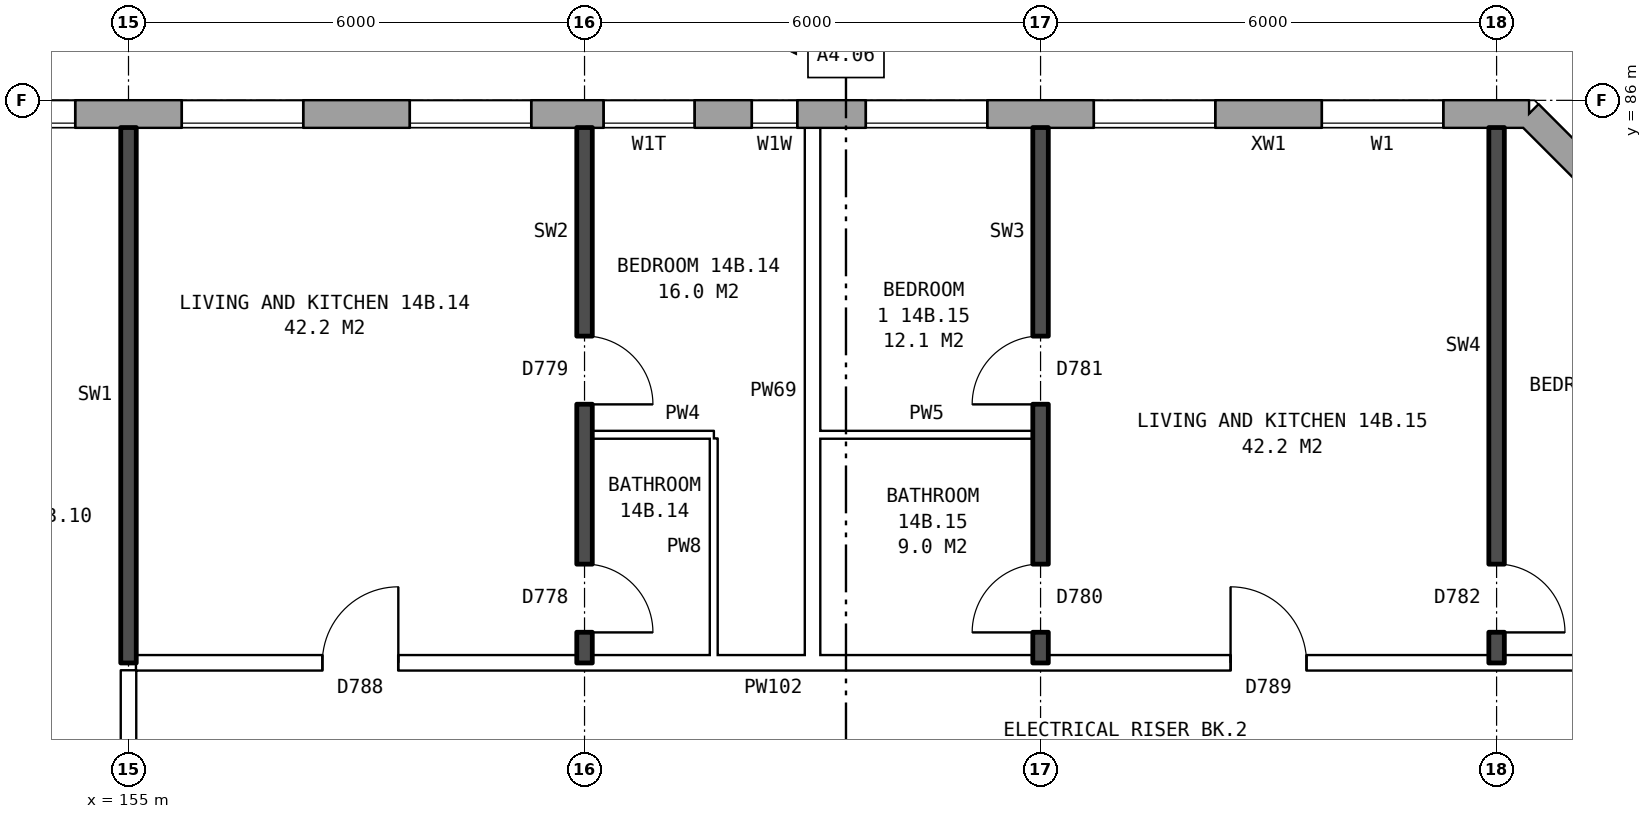
"""IFC4 building model, lengths in metres.
Left out: names, types, materials, properties, quantities, classifications, styles, units other than length and angle.
Written with IfcOpenShell. Run it as: python <this file> out.ifc"""

import sys

from ifc_helpers import new_model, si_unit, direction, frame, frame_2d, origin, place, context, subcontext, project, spatial, rectangle, extrude, element, fill, save


model = new_model("IFC4")
c1 = context("Model", 3, precision=1e-05, world=origin(), true_north=direction((0.0, 1.0)))
c2 = subcontext(c1, "Body", "Model", "MODEL_VIEW")
j1 = project(units=[si_unit("LENGTHUNIT", "METRE"), si_unit("PLANEANGLEUNIT", "RADIAN")], contexts=[c1])
p1 = place(None, origin())
s1 = spatial("IfcSite", under=j1, at=p1, CompositionType="ELEMENT")
p2 = place(p1, origin())
s2 = spatial("IfcBuilding", under=s1, at=p2, CompositionType="ELEMENT")
p3 = place(p2, frame((0.0, 0.0, 53.6)))
s3 = spatial("IfcBuildingStorey", under=s2, at=p3, CompositionType="ELEMENT", Elevation=53.6)
p4 = place(p3, frame((176.32, 82.925, 0.0), z_axis=(0.0, 0.0, 1.0), x_axis=(-0.707106781187, 0.707106781187, 0.0)))
e1 = element("IfcWall", 1, at=p4, inside=s3, PredefinedType="STANDARD", context=c2, shape_type="SweptSolid", body=[
    extrude(rectangle(XDim=4.094, YDim=0.36, at=frame_2d((2.047, 0.0))), origin(), (0.0, 0.0, 1.0), 2.85),
])
p5 = place(p4, frame((1.247, 0.0, 0.8)))
e2 = element("IfcOpeningElement", 2, at=p5, cuts=e1, PredefinedType="OPENING", context=c2, shape_type="SweptSolid", body=[
    extrude(rectangle(XDim=1.6, YDim=1.8, at=frame_2d((0.8, 0.9))), frame((0.0, 0.19, 0.0), z_axis=(0.0, -1.0, 0.0), x_axis=(1.0, 0.0, 0.0)), (0.0, 0.0, 1.0), 0.38),
])
p6 = place(p3, frame((173.425, 85.82, 0.0), z_axis=(0.0, 0.0, 1.0), x_axis=(-1.0, 0.0, 0.0)))
e3 = element("IfcWall", 3, at=p6, inside=s3, PredefinedType="STANDARD", context=c2, shape_type="SweptSolid", body=[
    extrude(rectangle(XDim=39.351, YDim=0.36, at=frame_2d((19.675, 0.0))), origin(), (0.0, 0.0, 1.0), 2.85),
])
p7 = place(p6, frame((1.125, 0.0, 0.8)))
e4 = element("IfcOpeningElement", 4, at=p7, cuts=e3, PredefinedType="OPENING", context=c2, shape_type="SweptSolid", body=[
    extrude(rectangle(XDim=1.6, YDim=1.8, at=frame_2d((0.8, 0.9))), frame((0.0, 0.19, 0.0), z_axis=(0.0, -1.0, 0.0), x_axis=(1.0, 0.0, 0.0)), (0.0, 0.0, 1.0), 0.38),
])
p8 = place(p6, frame((4.125, 0.0, 0.8)))
e5 = element("IfcOpeningElement", 5, at=p8, cuts=e3, PredefinedType="OPENING", context=c2, shape_type="SweptSolid", body=[
    extrude(rectangle(XDim=1.6, YDim=1.8, at=frame_2d((0.8, 0.9))), frame((0.0, 0.19, 0.0), z_axis=(0.0, -1.0, 0.0), x_axis=(1.0, 0.0, 0.0)), (0.0, 0.0, 1.0), 0.38),
])
p9 = place(p6, frame((7.125, 0.0, 0.8)))
e6 = element("IfcOpeningElement", 6, at=p9, cuts=e3, PredefinedType="OPENING", context=c2, shape_type="SweptSolid", body=[
    extrude(rectangle(XDim=1.6, YDim=1.8, at=frame_2d((0.8, 0.9))), frame((0.0, 0.19, 0.0), z_axis=(0.0, -1.0, 0.0), x_axis=(1.0, 0.0, 0.0)), (0.0, 0.0, 1.0), 0.38),
])
p10 = place(p6, frame((9.625, 0.0, 1.65)))
e7 = element("IfcOpeningElement", 7, at=p10, cuts=e3, PredefinedType="OPENING", context=c2, shape_type="SweptSolid", body=[
    extrude(rectangle(XDim=0.6, YDim=0.9, at=frame_2d((0.3, 0.45))), frame((0.0, 0.19, 0.0), z_axis=(0.0, -1.0, 0.0), x_axis=(1.0, 0.0, 0.0)), (0.0, 0.0, 1.0), 0.38),
])
p11 = place(p6, frame((13.125, 0.0, 0.8)))
e8 = element("IfcOpeningElement", 8, at=p11, cuts=e3, PredefinedType="OPENING", context=c2, shape_type="SweptSolid", body=[
    extrude(rectangle(XDim=1.6, YDim=1.8, at=frame_2d((0.8, 0.9))), frame((0.0, 0.19, 0.0), z_axis=(0.0, -1.0, 0.0), x_axis=(1.0, 0.0, 0.0)), (0.0, 0.0, 1.0), 0.38),
])
p12 = place(p6, frame((16.125, 0.0, 0.8)))
e9 = element("IfcOpeningElement", 9, at=p12, cuts=e3, PredefinedType="OPENING", context=c2, shape_type="SweptSolid", body=[
    extrude(rectangle(XDim=1.6, YDim=1.8, at=frame_2d((0.8, 0.9))), frame((0.0, 0.19, 0.0), z_axis=(0.0, -1.0, 0.0), x_axis=(1.0, 0.0, 0.0)), (0.0, 0.0, 1.0), 0.38),
])
p13 = place(p6, frame((19.125, 0.0, 0.8)))
e10 = element("IfcOpeningElement", 10, at=p13, cuts=e3, PredefinedType="OPENING", context=c2, shape_type="SweptSolid", body=[
    extrude(rectangle(XDim=1.6, YDim=1.8, at=frame_2d((0.8, 0.9))), frame((0.0, 0.19, 0.0), z_axis=(0.0, -1.0, 0.0), x_axis=(1.0, 0.0, 0.0)), (0.0, 0.0, 1.0), 0.38),
])
p14 = place(p6, frame((22.125, 0.0, 0.8)))
e11 = element("IfcOpeningElement", 11, at=p14, cuts=e3, PredefinedType="OPENING", context=c2, shape_type="SweptSolid", body=[
    extrude(rectangle(XDim=1.6, YDim=1.8, at=frame_2d((0.8, 0.9))), frame((0.0, 0.19, 0.0), z_axis=(0.0, -1.0, 0.0), x_axis=(1.0, 0.0, 0.0)), (0.0, 0.0, 1.0), 0.38),
])
p15 = place(p6, frame((25.125, 0.0, 0.8)))
e12 = element("IfcOpeningElement", 12, at=p15, cuts=e3, PredefinedType="OPENING", context=c2, shape_type="SweptSolid", body=[
    extrude(rectangle(XDim=1.6, YDim=1.8, at=frame_2d((0.8, 0.9))), frame((0.0, 0.19, 0.0), z_axis=(0.0, -1.0, 0.0), x_axis=(1.0, 0.0, 0.0)), (0.0, 0.0, 1.0), 0.38),
])
p16 = place(p6, frame((27.575, 0.0, 0.15)))
e13 = element("IfcOpeningElement", 13, at=p16, cuts=e3, PredefinedType="OPENING", context=c2, shape_type="SweptSolid", body=[
    extrude(rectangle(XDim=1.0, YDim=0.9, at=frame_2d((0.5, 0.45))), frame((0.0, 0.19, 0.0), z_axis=(0.0, -1.0, 0.0), x_axis=(1.0, 0.0, 0.0)), (0.0, 0.0, 1.0), 0.38),
])
p17 = place(p6, frame((31.125, 0.0, 0.8)))
e14 = element("IfcOpeningElement", 14, at=p17, cuts=e3, PredefinedType="OPENING", context=c2, shape_type="SweptSolid", body=[
    extrude(rectangle(XDim=1.6, YDim=1.8, at=frame_2d((0.8, 0.9))), frame((0.0, 0.19, 0.0), z_axis=(0.0, -1.0, 0.0), x_axis=(1.0, 0.0, 0.0)), (0.0, 0.0, 1.0), 0.38),
])
p18 = place(p6, frame((34.125, 0.0, 0.8)))
e15 = element("IfcOpeningElement", 15, at=p18, cuts=e3, PredefinedType="OPENING", context=c2, shape_type="SweptSolid", body=[
    extrude(rectangle(XDim=1.6, YDim=1.8, at=frame_2d((0.8, 0.9))), frame((0.0, 0.19, 0.0), z_axis=(0.0, -1.0, 0.0), x_axis=(1.0, 0.0, 0.0)), (0.0, 0.0, 1.0), 0.38),
])
p19 = place(p6, frame((37.125, 0.0, 0.8)))
e16 = element("IfcOpeningElement", 16, at=p19, cuts=e3, PredefinedType="OPENING", context=c2, shape_type="SweptSolid", body=[
    extrude(rectangle(XDim=1.6, YDim=1.8, at=frame_2d((0.8, 0.9))), frame((0.0, 0.19, 0.0), z_axis=(0.0, -1.0, 0.0), x_axis=(1.0, 0.0, 0.0)), (0.0, 0.0, 1.0), 0.38),
])
p20 = place(p6, frame((10.975, 0.0, 0.35)))
e17 = element("IfcOpeningElement", 17, at=p20, cuts=e3, PredefinedType="OPENING", context=c2, shape_type="SweptSolid", body=[
    extrude(rectangle(XDim=1.2, YDim=0.9, at=frame_2d((0.6, 0.45))), frame((0.0, 0.19, 0.0), z_axis=(0.0, -1.0, 0.0), x_axis=(1.0, 0.0, 0.0)), (0.0, 0.0, 1.0), 0.38),
])
p21 = place(p6, frame((29.125, 0.0, 1.65)))
e18 = element("IfcOpeningElement", 18, at=p21, cuts=e3, PredefinedType="OPENING", context=c2, shape_type="SweptSolid", body=[
    extrude(rectangle(XDim=1.0, YDim=0.9, at=frame_2d((0.5, 0.45))), frame((0.0, 0.19, 0.0), z_axis=(0.0, -1.0, 0.0), x_axis=(1.0, 0.0, 0.0)), (0.0, 0.0, 1.0), 0.38),
])
p22 = place(p3, frame((155.1, 78.6, 0.0), z_axis=(0.0, 0.0, 1.0), x_axis=(1.0, 0.0, 0.0)))
e19 = element("IfcWall", 19, at=p22, inside=s3, PredefinedType="PARTITIONING", context=c2, shape_type="SweptSolid", body=[
    extrude(rectangle(XDim=21.04, YDim=0.2, at=frame_2d((10.52, 0.0))), origin(), (0.0, 0.0, 1.0), 2.85),
])
p23 = place(p22, frame((2.45, 0.0, 0.0)))
e20 = element("IfcOpeningElement", 20, at=p23, cuts=e19, PredefinedType="OPENING", context=c2, shape_type="SweptSolid", body=[
    extrude(rectangle(XDim=1.0, YDim=2.1, at=frame_2d((0.5, 1.05))), frame((0.0, 0.11, 0.0), z_axis=(0.0, -1.0, 0.0), x_axis=(1.0, 0.0, 0.0)), (0.0, 0.0, 1.0), 0.22),
])
p24 = place(p22, frame((14.4, 0.0, 0.0)))
e21 = element("IfcOpeningElement", 21, at=p24, cuts=e19, PredefinedType="OPENING", context=c2, shape_type="SweptSolid", body=[
    extrude(rectangle(XDim=1.0, YDim=2.1, at=frame_2d((0.5, 1.05))), frame((0.0, 0.11, 0.0), z_axis=(0.0, -1.0, 0.0), x_axis=(1.0, 0.0, 0.0)), (0.0, 0.0, 1.0), 0.22),
])
p25 = place(p3, frame((161.1, 81.6, 0.0), z_axis=(0.0, 0.0, 1.0), x_axis=(1.0, 0.0, 0.0)))
e22 = element("IfcWall", 22, at=p25, inside=s3, PredefinedType="PARTITIONING", context=c2, shape_type="SweptSolid", body=[
    extrude(rectangle(XDim=1.6, YDim=0.1, at=frame_2d((0.8, 0.0))), origin(), (0.0, 0.0, 1.0), 2.85),
])
p26 = place(p3, frame((164.1, 81.6, 0.0), z_axis=(0.0, 0.0, 1.0), x_axis=(1.0, 0.0, 0.0)))
e23 = element("IfcWall", 23, at=p26, inside=s3, PredefinedType="PARTITIONING", context=c2, shape_type="SweptSolid", body=[
    extrude(rectangle(XDim=2.8, YDim=0.1, at=frame_2d((1.4, 0.0))), origin(), (0.0, 0.0, 1.0), 2.85),
])
p27 = place(p3, frame((155.0, 76.3, 0.0), z_axis=(0.0, 0.0, 1.0), x_axis=(0.0, 1.0, 0.0)))
e24 = element("IfcWall", 24, at=p27, inside=s3, PredefinedType="PARTITIONING", context=c2, shape_type="SweptSolid", body=[
    extrude(rectangle(XDim=2.2, YDim=0.2, at=frame_2d((1.1, 0.0))), origin(), (0.0, 0.0, 1.0), 2.85),
])
p28 = place(p3, frame((155.0, 78.6, 0.0), z_axis=(0.0, 0.0, 1.0), x_axis=(0.0, 1.0, 0.0)))
e25 = element("IfcWall", 25, at=p28, inside=s3, PredefinedType="SOLIDWALL", context=c2, shape_type="SweptSolid", body=[
    extrude(rectangle(XDim=7.04, YDim=0.2, at=frame_2d((3.52, 0.0))), origin(), (0.0, 0.0, 1.0), 2.85),
])
p29 = place(p3, frame((161.0, 78.6, 0.0), z_axis=(0.0, 0.0, 1.0), x_axis=(0.0, 1.0, 0.0)))
e26 = element("IfcWall", 26, at=p29, inside=s3, PredefinedType="SOLIDWALL", context=c2, shape_type="SweptSolid", body=[
    extrude(rectangle(XDim=7.04, YDim=0.2, at=frame_2d((3.52, 0.0))), origin(), (0.0, 0.0, 1.0), 2.85),
])
p30 = place(p29, frame((3.4, 0.0, 0.0)))
e27 = element("IfcOpeningElement", 27, at=p30, cuts=e26, PredefinedType="OPENING", context=c2, shape_type="SweptSolid", body=[
    extrude(rectangle(XDim=0.9, YDim=2.1, at=frame_2d((0.45, 1.05))), frame((0.0, 0.11, 0.0), z_axis=(0.0, -1.0, 0.0), x_axis=(1.0, 0.0, 0.0)), (0.0, 0.0, 1.0), 0.22),
])
p31 = place(p29, frame((0.4, 0.0, 0.0)))
e28 = element("IfcOpeningElement", 28, at=p31, cuts=e26, PredefinedType="OPENING", context=c2, shape_type="SweptSolid", body=[
    extrude(rectangle(XDim=0.9, YDim=2.1, at=frame_2d((0.45, 1.05))), frame((0.0, 0.11, 0.0), z_axis=(0.0, -1.0, 0.0), x_axis=(1.0, 0.0, 0.0)), (0.0, 0.0, 1.0), 0.22),
])
p32 = place(p3, frame((162.7, 78.7, 0.0), z_axis=(0.0, 0.0, 1.0), x_axis=(0.0, 1.0, 0.0)))
e29 = element("IfcWall", 29, at=p32, inside=s3, PredefinedType="PARTITIONING", context=c2, shape_type="SweptSolid", body=[
    extrude(rectangle(XDim=2.85, YDim=0.1, at=frame_2d((1.425, 0.0))), origin(), (0.0, 0.0, 1.0), 2.85),
])
p33 = place(p3, frame((164.0, 78.7, 0.0), z_axis=(0.0, 0.0, 1.0), x_axis=(0.0, 1.0, 0.0)))
e30 = element("IfcWall", 30, at=p33, inside=s3, PredefinedType="PARTITIONING", context=c2, shape_type="SweptSolid", body=[
    extrude(rectangle(XDim=6.94, YDim=0.2, at=frame_2d((3.47, 0.0))), origin(), (0.0, 0.0, 1.0), 2.85),
])
p34 = place(p3, frame((167.0, 78.6, 0.0), z_axis=(0.0, 0.0, 1.0), x_axis=(0.0, 1.0, 0.0)))
e31 = element("IfcWall", 31, at=p34, inside=s3, PredefinedType="SOLIDWALL", context=c2, shape_type="SweptSolid", body=[
    extrude(rectangle(XDim=7.04, YDim=0.2, at=frame_2d((3.52, 0.0))), origin(), (0.0, 0.0, 1.0), 2.85),
])
p35 = place(p34, frame((3.4, 0.0, 0.0)))
e32 = element("IfcOpeningElement", 32, at=p35, cuts=e31, PredefinedType="OPENING", context=c2, shape_type="SweptSolid", body=[
    extrude(rectangle(XDim=0.9, YDim=2.1, at=frame_2d((0.45, 1.05))), frame((0.0, 0.11, 0.0), z_axis=(0.0, -1.0, 0.0), x_axis=(1.0, 0.0, 0.0)), (0.0, 0.0, 1.0), 0.22),
])
p36 = place(p34, frame((0.4, 0.0, 0.0)))
e33 = element("IfcOpeningElement", 33, at=p36, cuts=e31, PredefinedType="OPENING", context=c2, shape_type="SweptSolid", body=[
    extrude(rectangle(XDim=0.9, YDim=2.1, at=frame_2d((0.45, 1.05))), frame((0.0, 0.11, 0.0), z_axis=(0.0, -1.0, 0.0), x_axis=(1.0, 0.0, 0.0)), (0.0, 0.0, 1.0), 0.22),
])
p37 = place(p3, frame((173.0, 78.6, 0.0), z_axis=(0.0, 0.0, 1.0), x_axis=(0.0, 1.0, 0.0)))
e34 = element("IfcWall", 34, at=p37, inside=s3, PredefinedType="SOLIDWALL", context=c2, shape_type="SweptSolid", body=[
    extrude(rectangle(XDim=7.04, YDim=0.2, at=frame_2d((3.52, 0.0))), origin(), (0.0, 0.0, 1.0), 2.85),
])
p38 = place(p37, frame((0.4, 0.0, 0.0)))
e35 = element("IfcOpeningElement", 35, at=p38, cuts=e34, PredefinedType="OPENING", context=c2, shape_type="SweptSolid", body=[
    extrude(rectangle(XDim=0.9, YDim=2.1, at=frame_2d((0.45, 1.05))), frame((0.0, 0.11, 0.0), z_axis=(0.0, -1.0, 0.0), x_axis=(1.0, 0.0, 0.0)), (0.0, 0.0, 1.0), 0.22),
])
p39 = place(p7, origin())
e36 = element("IfcWindow", 36, at=p39, inside=s3, PartitioningType="SINGLE_PANEL", PredefinedType="WINDOW", context=c2, shape_type="SweptSolid", body=[
    extrude(rectangle(XDim=1.6, YDim=1.8, at=frame_2d((0.8, 0.9))), frame((0.0, 0.15, 0.0), z_axis=(0.0, -1.0, 0.0), x_axis=(1.0, 0.0, 0.0)), (0.0, 0.0, 1.0), 0.06),
])
fill(e4, e36)
p40 = place(p8, origin())
e37 = element("IfcWindow", 37, at=p40, inside=s3, PartitioningType="SINGLE_PANEL", PredefinedType="WINDOW", context=c2, shape_type="SweptSolid", body=[
    extrude(rectangle(XDim=1.6, YDim=1.8, at=frame_2d((0.8, 0.9))), frame((0.0, 0.15, 0.0), z_axis=(0.0, -1.0, 0.0), x_axis=(1.0, 0.0, 0.0)), (0.0, 0.0, 1.0), 0.06),
])
fill(e5, e37)
p41 = place(p9, origin())
e38 = element("IfcWindow", 38, at=p41, inside=s3, PartitioningType="SINGLE_PANEL", PredefinedType="WINDOW", context=c2, shape_type="SweptSolid", body=[
    extrude(rectangle(XDim=1.6, YDim=1.8, at=frame_2d((0.8, 0.9))), frame((0.0, 0.15, 0.0), z_axis=(0.0, -1.0, 0.0), x_axis=(1.0, 0.0, 0.0)), (0.0, 0.0, 1.0), 0.06),
])
fill(e6, e38)
p42 = place(p10, origin())
e39 = element("IfcWindow", 39, at=p42, inside=s3, PartitioningType="SINGLE_PANEL", PredefinedType="WINDOW", context=c2, shape_type="SweptSolid", body=[
    extrude(rectangle(XDim=0.6, YDim=0.9, at=frame_2d((0.3, 0.45))), frame((0.0, 0.15, 0.0), z_axis=(0.0, -1.0, 0.0), x_axis=(1.0, 0.0, 0.0)), (0.0, 0.0, 1.0), 0.06),
])
fill(e7, e39)
p43 = place(p11, origin())
e40 = element("IfcWindow", 40, at=p43, inside=s3, PartitioningType="SINGLE_PANEL", PredefinedType="WINDOW", context=c2, shape_type="SweptSolid", body=[
    extrude(rectangle(XDim=1.6, YDim=1.8, at=frame_2d((0.8, 0.9))), frame((0.0, 0.15, 0.0), z_axis=(0.0, -1.0, 0.0), x_axis=(1.0, 0.0, 0.0)), (0.0, 0.0, 1.0), 0.06),
])
fill(e8, e40)
p44 = place(p12, origin())
e41 = element("IfcWindow", 41, at=p44, inside=s3, PartitioningType="SINGLE_PANEL", PredefinedType="WINDOW", context=c2, shape_type="SweptSolid", body=[
    extrude(rectangle(XDim=1.6, YDim=1.8, at=frame_2d((0.8, 0.9))), frame((0.0, 0.15, 0.0), z_axis=(0.0, -1.0, 0.0), x_axis=(1.0, 0.0, 0.0)), (0.0, 0.0, 1.0), 0.06),
])
fill(e9, e41)
p45 = place(p13, origin())
e42 = element("IfcWindow", 42, at=p45, inside=s3, PartitioningType="SINGLE_PANEL", PredefinedType="WINDOW", context=c2, shape_type="SweptSolid", body=[
    extrude(rectangle(XDim=1.6, YDim=1.8, at=frame_2d((0.8, 0.9))), frame((0.0, 0.15, 0.0), z_axis=(0.0, -1.0, 0.0), x_axis=(1.0, 0.0, 0.0)), (0.0, 0.0, 1.0), 0.06),
])
fill(e10, e42)
p46 = place(p30, frame((0.9, 0.0, 0.0), z_axis=(0.0, 0.0, 1.0), x_axis=(-1.0, 0.0, 0.0)))
e43 = element("IfcDoor", 43, at=p46, inside=s3, OperationType="SINGLE_SWING_RIGHT", PredefinedType="DOOR", context=c2, shape_type="SweptSolid", body=[
    extrude(rectangle(XDim=0.9, YDim=2.1, at=frame_2d((0.45, 1.05))), frame((0.0, 0.025, 0.0), z_axis=(0.0, -1.0, 0.0), x_axis=(1.0, 0.0, 0.0)), (0.0, 0.0, 1.0), 0.05),
])
fill(e27, e43)
p47 = place(p23, origin())
e44 = element("IfcDoor", 44, at=p47, inside=s3, OperationType="SINGLE_SWING_RIGHT", PredefinedType="DOOR", context=c2, shape_type="SweptSolid", body=[
    extrude(rectangle(XDim=1.0, YDim=2.1, at=frame_2d((0.5, 1.05))), frame((0.0, 0.025, 0.0), z_axis=(0.0, -1.0, 0.0), x_axis=(1.0, 0.0, 0.0)), (0.0, 0.0, 1.0), 0.05),
])
fill(e20, e44)
p48 = place(p31, frame((0.9, 0.0, 0.0), z_axis=(0.0, 0.0, 1.0), x_axis=(-1.0, 0.0, 0.0)))
e45 = element("IfcDoor", 45, at=p48, inside=s3, OperationType="SINGLE_SWING_RIGHT", PredefinedType="DOOR", context=c2, shape_type="SweptSolid", body=[
    extrude(rectangle(XDim=0.9, YDim=2.1, at=frame_2d((0.45, 1.05))), frame((0.0, 0.025, 0.0), z_axis=(0.0, -1.0, 0.0), x_axis=(1.0, 0.0, 0.0)), (0.0, 0.0, 1.0), 0.05),
])
fill(e28, e45)
p49 = place(p35, origin())
e46 = element("IfcDoor", 46, at=p49, inside=s3, OperationType="SINGLE_SWING_LEFT", PredefinedType="DOOR", context=c2, shape_type="SweptSolid", body=[
    extrude(rectangle(XDim=0.9, YDim=2.1, at=frame_2d((0.45, 1.05))), frame((0.0, 0.025, 0.0), z_axis=(0.0, -1.0, 0.0), x_axis=(1.0, 0.0, 0.0)), (0.0, 0.0, 1.0), 0.05),
])
fill(e32, e46)
p50 = place(p38, frame((0.9, 0.0, 0.0), z_axis=(0.0, 0.0, 1.0), x_axis=(-1.0, 0.0, 0.0)))
e47 = element("IfcDoor", 47, at=p50, inside=s3, OperationType="SINGLE_SWING_RIGHT", PredefinedType="DOOR", context=c2, shape_type="SweptSolid", body=[
    extrude(rectangle(XDim=0.9, YDim=2.1, at=frame_2d((0.45, 1.05))), frame((0.0, 0.025, 0.0), z_axis=(0.0, -1.0, 0.0), x_axis=(1.0, 0.0, 0.0)), (0.0, 0.0, 1.0), 0.05),
])
fill(e35, e47)
p51 = place(p24, origin())
e48 = element("IfcDoor", 48, at=p51, inside=s3, OperationType="SINGLE_SWING_LEFT", PredefinedType="DOOR", context=c2, shape_type="SweptSolid", body=[
    extrude(rectangle(XDim=1.0, YDim=2.1, at=frame_2d((0.5, 1.05))), frame((0.0, 0.025, 0.0), z_axis=(0.0, -1.0, 0.0), x_axis=(1.0, 0.0, 0.0)), (0.0, 0.0, 1.0), 0.05),
])
fill(e21, e48)
p52 = place(p36, origin())
e49 = element("IfcDoor", 49, at=p52, inside=s3, OperationType="SINGLE_SWING_LEFT", PredefinedType="DOOR", context=c2, shape_type="SweptSolid", body=[
    extrude(rectangle(XDim=0.9, YDim=2.1, at=frame_2d((0.45, 1.05))), frame((0.0, 0.025, 0.0), z_axis=(0.0, -1.0, 0.0), x_axis=(1.0, 0.0, 0.0)), (0.0, 0.0, 1.0), 0.05),
])
fill(e33, e49)
p53 = place(p20, origin())
e50 = element("IfcWindow", 50, at=p53, inside=s3, PartitioningType="SINGLE_PANEL", PredefinedType="WINDOW", context=c2, shape_type="SweptSolid", body=[
    extrude(rectangle(XDim=1.2, YDim=0.9, at=frame_2d((0.6, 0.45))), frame((0.0, 0.15, 0.0), z_axis=(0.0, -1.0, 0.0), x_axis=(1.0, 0.0, 0.0)), (0.0, 0.0, 1.0), 0.06),
])
fill(e17, e50)
save(model, sys.argv[1])
